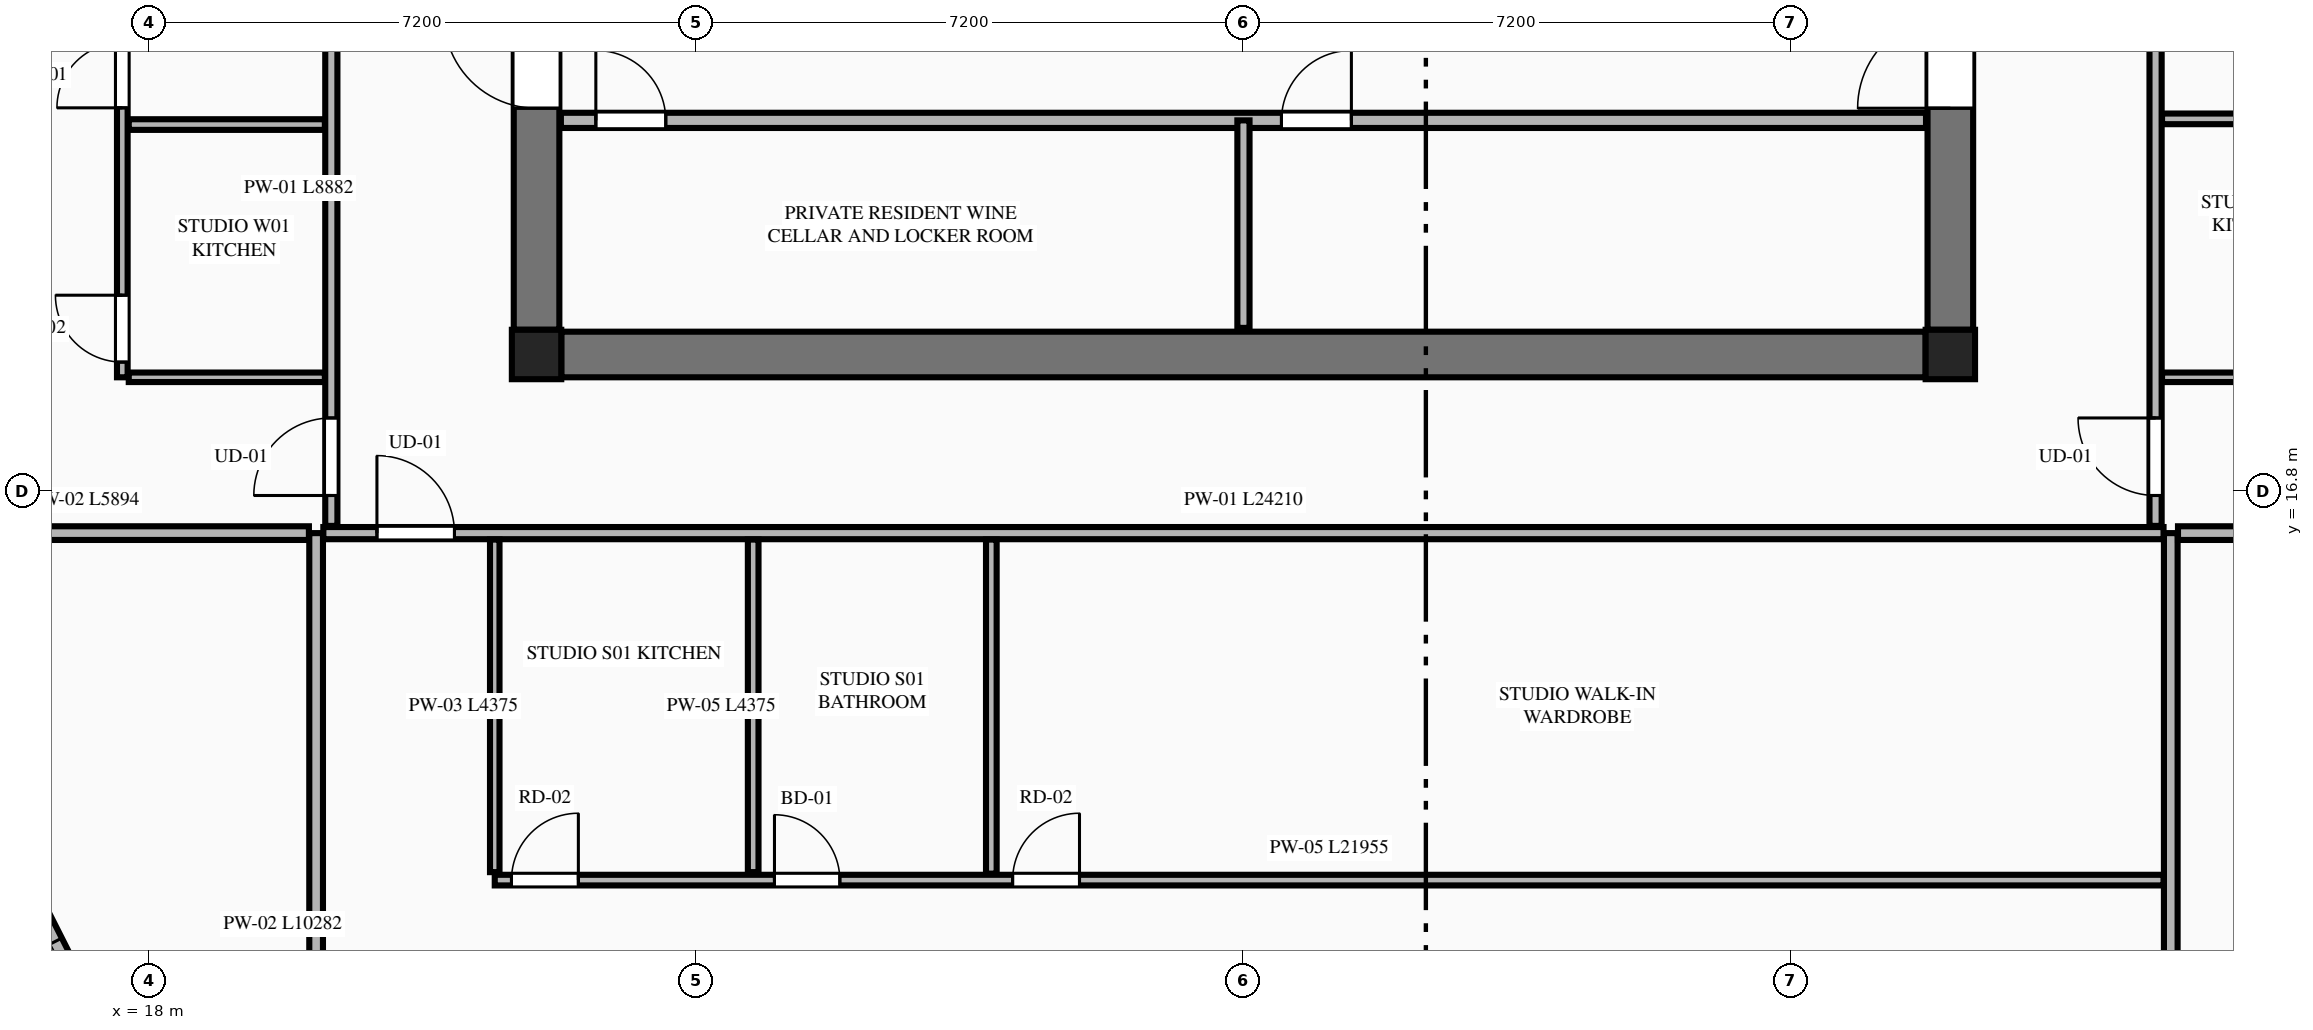
"""IFC4 building model, lengths in metres.
Left out: names, types, materials, properties, quantities, classifications, styles, units other than length and angle.
Written with IfcOpenShell. Run it as: python <this file> out.ifc"""

import sys

from ifc_helpers import new_model, si_unit, direction, frame, frame_2d, origin, origin_2d, place, context, subcontext, project, spatial, rectangle, extrude, element, fill, save


model = new_model("IFC4")
c1 = context("Model", 3, precision=1e-05, world=origin(), true_north=direction((0.0, 1.0)))
c2 = subcontext(c1, "Body", "Model", "MODEL_VIEW")
j1 = project(units=[si_unit("LENGTHUNIT", "METRE"), si_unit("PLANEANGLEUNIT", "RADIAN")], contexts=[c1])
p1 = place(None, origin())
s1 = spatial("IfcSite", under=j1, at=p1, CompositionType="ELEMENT")
p2 = place(p1, origin())
s2 = spatial("IfcBuilding", under=s1, at=p2, CompositionType="ELEMENT")
p3 = place(p2, frame((0.0, 0.0, 214.5)))
s3 = spatial("IfcBuildingStorey", under=s2, at=p3, CompositionType="ELEMENT", Elevation=214.5)
for number, where, z_axis, x_axis in (
    (1, (23.1, 18.6, 0.0), (0.0, 0.0, 1.0), (1.0, 0.0, 0.0)),
    (2, (41.7, 18.6, 0.0), (0.0, 0.0, 1.0), (1.0, 0.0, 0.0)),
):
    element("IfcColumn", number, at=place(p3, frame(where, z_axis=z_axis, x_axis=x_axis)), inside=s3, PredefinedType="COLUMN", context=c2, shape_type="SweptSolid", body=[
        extrude(rectangle(XDim=0.65, YDim=0.65, at=origin_2d()), origin(), (0.0, 0.0, 1.0), 3.55),
    ])
p4 = place(p3, frame((23.425, 18.6, 0.0), z_axis=(0.0, 0.0, 1.0), x_axis=(1.0, 0.0, 0.0)))
e3 = element("IfcWall", 3, at=p4, inside=s3, PredefinedType="SHEAR", context=c2, shape_type="SweptSolid", body=[
    extrude(rectangle(XDim=17.95, YDim=0.6, at=frame_2d((8.975, 0.0))), origin(), (0.0, 0.0, 1.0), 3.35),
])
p5 = place(p3, frame((23.1, 18.925, 0.0), z_axis=(0.0, 0.0, 1.0), x_axis=(0.0, 1.0, 0.0)))
e4 = element("IfcWall", 4, at=p5, inside=s3, PredefinedType="SHEAR", context=c2, shape_type="SweptSolid", body=[
    extrude(rectangle(XDim=13.95, YDim=0.6, at=frame_2d((6.975, 0.0))), origin(), (0.0, 0.0, 1.0), 3.35),
])
p6 = place(p5, frame((2.915, 0.0, 0.0)))
e5 = element("IfcOpeningElement", 5, at=p6, cuts=e4, PredefinedType="OPENING", context=c2, shape_type="SweptSolid", body=[
    extrude(rectangle(XDim=1.22, YDim=2.25, at=frame_2d((0.61, 1.125))), frame((0.0, 0.31, 0.0), z_axis=(0.0, -1.0, 0.0), x_axis=(1.0, 0.0, 0.0)), (0.0, 0.0, 1.0), 0.62),
])
p7 = place(p3, frame((41.7, 18.925, 0.0), z_axis=(0.0, 0.0, 1.0), x_axis=(0.0, 1.0, 0.0)))
e6 = element("IfcWall", 6, at=p7, inside=s3, PredefinedType="SHEAR", context=c2, shape_type="SweptSolid", body=[
    extrude(rectangle(XDim=13.95, YDim=0.6, at=frame_2d((6.975, 0.0))), origin(), (0.0, 0.0, 1.0), 3.35),
])
p8 = place(p7, frame((2.915, 0.0, 0.0)))
e7 = element("IfcOpeningElement", 7, at=p8, cuts=e6, PredefinedType="OPENING", context=c2, shape_type="SweptSolid", body=[
    extrude(rectangle(XDim=1.22, YDim=2.25, at=frame_2d((0.61, 1.125))), frame((0.0, 0.31, 0.0), z_axis=(0.0, -1.0, 0.0), x_axis=(1.0, 0.0, 0.0)), (0.0, 0.0, 1.0), 0.62),
])
p9 = place(p3, frame((23.42, 21.68, 0.0), z_axis=(0.0, 0.0, 1.0), x_axis=(1.0, 0.0, 0.0)))
e8 = element("IfcWall", 8, at=p9, inside=s3, PredefinedType="PLUMBINGWALL", context=c2, shape_type="SweptSolid", body=[
    extrude(rectangle(XDim=17.96, YDim=0.2, at=frame_2d((8.98, 0.0))), origin(), (0.0, 0.0, 1.0), 3.35),
])
p10 = place(p9, frame((0.46, 0.0, 0.0)))
e9 = element("IfcOpeningElement", 9, at=p10, cuts=e8, PredefinedType="OPENING", context=c2, shape_type="SweptSolid", body=[
    extrude(rectangle(XDim=0.92, YDim=2.15, at=frame_2d((0.46, 1.075))), frame((0.0, 0.11, 0.0), z_axis=(0.0, -1.0, 0.0), x_axis=(1.0, 0.0, 0.0)), (0.0, 0.0, 1.0), 0.22),
])
p11 = place(p9, frame((9.48, 0.0, 0.0)))
e10 = element("IfcOpeningElement", 10, at=p11, cuts=e8, PredefinedType="OPENING", context=c2, shape_type="SweptSolid", body=[
    extrude(rectangle(XDim=0.92, YDim=2.15, at=frame_2d((0.46, 1.075))), frame((0.0, 0.11, 0.0), z_axis=(0.0, -1.0, 0.0), x_axis=(1.0, 0.0, 0.0)), (0.0, 0.0, 1.0), 0.22),
])
p12 = place(p3, frame((32.4, 18.95, 0.0), z_axis=(0.0, 0.0, 1.0), x_axis=(0.0, 1.0, 0.0)))
e11 = element("IfcWall", 11, at=p12, inside=s3, PredefinedType="PARTITIONING", context=c2, shape_type="SweptSolid", body=[
    extrude(rectangle(XDim=2.73, YDim=0.16, at=frame_2d((1.365, 0.0))), origin(), (0.0, 0.0, 1.0), 3.35),
])
p13 = place(p3, frame((15.843, 12.545, 0.0), z_axis=(0.0, 0.0, 1.0), x_axis=(0.451544279509, -0.892248711763, 0.0)))
e12 = element("IfcWall", 12, at=p13, inside=s3, PredefinedType="STANDARD", context=c2, shape_type="SweptSolid", body=[
    extrude(rectangle(XDim=4.91, YDim=0.34, at=frame_2d((2.455, 0.0))), origin(), (0.0, 0.0, 1.0), 2.883),
])
p14 = place(p13, frame((1.905, 0.0, 0.75)))
e13 = element("IfcOpeningElement", 13, at=p14, cuts=e12, PredefinedType="OPENING", context=c2, shape_type="SweptSolid", body=[
    extrude(rectangle(XDim=1.1, YDim=1.983, at=frame_2d((0.55, 0.991))), frame((0.0, 0.18, 0.0), z_axis=(0.0, -1.0, 0.0), x_axis=(1.0, 0.0, 0.0)), (0.0, 0.0, 1.0), 0.36),
])
for number, where, z_axis, x_axis in (
    (14, (20.2, 5.968, 0.0), (0.0, 0.0, 1.0), (0.0, 1.0, 0.0)),
    (15, (44.6, 5.968, 0.0), (0.0, 0.0, 1.0), (0.0, 1.0, 0.0)),
):
    element("IfcWall", number, at=place(p3, frame(where, z_axis=z_axis, x_axis=x_axis)), inside=s3, PredefinedType="PARTITIONING", context=c2, shape_type="SweptSolid", body=[
        extrude(rectangle(XDim=10.282, YDim=0.18, at=frame_2d((5.141, 0.0))), origin(), (0.0, 0.0, 1.0), 3.35),
    ])
p15 = place(p3, frame((20.295, 16.25, 0.0), z_axis=(0.0, 0.0, 1.0), x_axis=(1.0, 0.0, 0.0)))
e16 = element("IfcWall", 16, at=p15, inside=s3, PredefinedType="PARTITIONING", context=c2, shape_type="SweptSolid", body=[
    extrude(rectangle(XDim=24.21, YDim=0.16, at=frame_2d((12.105, 0.0))), origin(), (0.0, 0.0, 1.0), 3.35),
])
p16 = place(p15, frame((0.705, 0.0, 0.0)))
e17 = element("IfcOpeningElement", 17, at=p16, cuts=e16, PredefinedType="OPENING", context=c2, shape_type="SweptSolid", body=[
    extrude(rectangle(XDim=1.02, YDim=2.25, at=frame_2d((0.51, 1.125))), frame((0.0, 0.09, 0.0), z_axis=(0.0, -1.0, 0.0), x_axis=(1.0, 0.0, 0.0)), (0.0, 0.0, 1.0), 0.18),
])
p17 = place(p3, frame((22.55, 11.79, 0.0), z_axis=(0.0, 0.0, 1.0), x_axis=(0.0, 1.0, 0.0)))
e18 = element("IfcWall", 18, at=p17, inside=s3, PredefinedType="PARTITIONING", context=c2, shape_type="SweptSolid", body=[
    extrude(rectangle(XDim=4.375, YDim=0.125, at=frame_2d((2.188, 0.0))), origin(), (0.0, 0.0, 1.0), 2.807),
])
p18 = place(p3, frame((22.55, 11.685, 0.0), z_axis=(0.0, 0.0, 1.0), x_axis=(1.0, 0.0, 0.0)))
e19 = element("IfcWall", 19, at=p18, inside=s3, PredefinedType="PLUMBINGWALL", context=c2, shape_type="SweptSolid", body=[
    extrude(rectangle(XDim=21.955, YDim=0.14, at=frame_2d((10.978, 0.0))), origin(), (0.0, 0.0, 1.0), 3.35),
])
p19 = place(p18, frame((3.68, 0.0, 0.0)))
e20 = element("IfcOpeningElement", 20, at=p19, cuts=e19, PredefinedType="OPENING", context=c2, shape_type="SweptSolid", body=[
    extrude(rectangle(XDim=0.86, YDim=2.1, at=frame_2d((0.43, 1.05))), frame((0.0, 0.08, 0.0), z_axis=(0.0, -1.0, 0.0), x_axis=(1.0, 0.0, 0.0)), (0.0, 0.0, 1.0), 0.16),
])
p20 = place(p18, frame((6.813, 0.0, 0.0)))
e21 = element("IfcOpeningElement", 21, at=p20, cuts=e19, PredefinedType="OPENING", context=c2, shape_type="SweptSolid", body=[
    extrude(rectangle(XDim=0.88, YDim=2.15, at=frame_2d((0.44, 1.075))), frame((0.0, 0.08, 0.0), z_axis=(0.0, -1.0, 0.0), x_axis=(1.0, 0.0, 0.0)), (0.0, 0.0, 1.0), 0.16),
])
p21 = place(p18, frame((0.22, 0.0, 0.0)))
e22 = element("IfcOpeningElement", 22, at=p21, cuts=e19, PredefinedType="OPENING", context=c2, shape_type="SweptSolid", body=[
    extrude(rectangle(XDim=0.88, YDim=2.15, at=frame_2d((0.44, 1.075))), frame((0.0, 0.08, 0.0), z_axis=(0.0, -1.0, 0.0), x_axis=(1.0, 0.0, 0.0)), (0.0, 0.0, 1.0), 0.16),
])
p22 = place(p3, frame((25.95, 11.79, 0.0), z_axis=(0.0, 0.0, 1.0), x_axis=(0.0, 1.0, 0.0)))
e23 = element("IfcWall", 23, at=p22, inside=s3, PredefinedType="PLUMBINGWALL", context=c2, shape_type="SweptSolid", body=[
    extrude(rectangle(XDim=4.375, YDim=0.14, at=frame_2d((2.188, 0.0))), origin(), (0.0, 0.0, 1.0), 3.35),
])
p23 = place(p3, frame((29.083, 11.77, 0.0), z_axis=(0.0, 0.0, 1.0), x_axis=(0.0, 1.0, 0.0)))
e24 = element("IfcWall", 24, at=p23, inside=s3, PredefinedType="PLUMBINGWALL", context=c2, shape_type="SweptSolid", body=[
    extrude(rectangle(XDim=4.395, YDim=0.14, at=frame_2d((2.198, 0.0))), origin(), (0.0, 0.0, 1.0), 3.35),
])
for number, where, z_axis, x_axis in (
    (25, (14.211, 16.25, 0.0), (0.0, 0.0, 1.0), (1.0, 0.0, 0.0)),
    (26, (44.695, 16.25, 0.0), (0.0, 0.0, 1.0), (1.0, 0.0, 0.0)),
):
    element("IfcWall", number, at=place(p3, frame(where, z_axis=z_axis, x_axis=x_axis)), inside=s3, PredefinedType="PARTITIONING", context=c2, shape_type="SweptSolid", body=[
        extrude(rectangle(XDim=5.894, YDim=0.18, at=frame_2d((2.947, 0.0))), origin(), (0.0, 0.0, 1.0), 3.35),
    ])
p24 = place(p3, frame((20.4, 16.345, 0.0), z_axis=(0.0, 0.0, 1.0), x_axis=(0.0, 1.0, 0.0)))
e27 = element("IfcWall", 27, at=p24, inside=s3, PredefinedType="PARTITIONING", context=c2, shape_type="SweptSolid", body=[
    extrude(rectangle(XDim=8.882, YDim=0.16, at=frame_2d((4.441, 0.0))), origin(), (0.0, 0.0, 1.0), 3.35),
])
p25 = place(p24, frame((0.4, 0.0, 0.0)))
e28 = element("IfcOpeningElement", 28, at=p25, cuts=e27, PredefinedType="OPENING", context=c2, shape_type="SweptSolid", body=[
    extrude(rectangle(XDim=1.02, YDim=2.25, at=frame_2d((0.51, 1.125))), frame((0.0, 0.09, 0.0), z_axis=(0.0, -1.0, 0.0), x_axis=(1.0, 0.0, 0.0)), (0.0, 0.0, 1.0), 0.18),
])
p26 = place(p3, frame((17.735, 18.3, 0.0), z_axis=(0.0, 0.0, 1.0), x_axis=(1.0, 0.0, 0.0)))
e29 = element("IfcWall", 29, at=p26, inside=s3, PredefinedType="PARTITIONING", context=c2, shape_type="SweptSolid", body=[
    extrude(rectangle(XDim=2.58, YDim=0.125, at=frame_2d((1.29, 0.0))), origin(), (0.0, 0.0, 1.0), 2.807),
])
p27 = place(p3, frame((17.65, 18.3, 0.0), z_axis=(0.0, 0.0, 1.0), x_axis=(0.0, 1.0, 0.0)))
e30 = element("IfcWall", 30, at=p27, inside=s3, PredefinedType="PLUMBINGWALL", context=c2, shape_type="SweptSolid", body=[
    extrude(rectangle(XDim=6.927, YDim=0.14, at=frame_2d((3.463, 0.0))), origin(), (0.0, 0.0, 1.0), 3.35),
])
p28 = place(p27, frame((3.545, 0.0, 0.0)))
e31 = element("IfcOpeningElement", 31, at=p28, cuts=e30, PredefinedType="OPENING", context=c2, shape_type="SweptSolid", body=[
    extrude(rectangle(XDim=0.86, YDim=2.1, at=frame_2d((0.43, 1.05))), frame((0.0, 0.08, 0.0), z_axis=(0.0, -1.0, 0.0), x_axis=(1.0, 0.0, 0.0)), (0.0, 0.0, 1.0), 0.16),
])
p29 = place(p27, frame((0.2, 0.0, 0.0)))
e32 = element("IfcOpeningElement", 32, at=p29, cuts=e30, PredefinedType="OPENING", context=c2, shape_type="SweptSolid", body=[
    extrude(rectangle(XDim=0.88, YDim=2.15, at=frame_2d((0.44, 1.075))), frame((0.0, 0.08, 0.0), z_axis=(0.0, -1.0, 0.0), x_axis=(1.0, 0.0, 0.0)), (0.0, 0.0, 1.0), 0.16),
])
p30 = place(p3, frame((17.735, 21.625, 0.0), z_axis=(0.0, 0.0, 1.0), x_axis=(1.0, 0.0, 0.0)))
e33 = element("IfcWall", 33, at=p30, inside=s3, PredefinedType="PLUMBINGWALL", context=c2, shape_type="SweptSolid", body=[
    extrude(rectangle(XDim=2.58, YDim=0.14, at=frame_2d((1.29, 0.0))), origin(), (0.0, 0.0, 1.0), 3.35),
])
p31 = place(p3, frame((44.4, 16.345, 0.0), z_axis=(0.0, 0.0, 1.0), x_axis=(0.0, 1.0, 0.0)))
e34 = element("IfcWall", 34, at=p31, inside=s3, PredefinedType="PARTITIONING", context=c2, shape_type="SweptSolid", body=[
    extrude(rectangle(XDim=9.638, YDim=0.16, at=frame_2d((4.819, 0.0))), origin(), (0.0, 0.0, 1.0), 3.35),
])
p32 = place(p31, frame((0.4, 0.0, 0.0)))
e35 = element("IfcOpeningElement", 35, at=p32, cuts=e34, PredefinedType="OPENING", context=c2, shape_type="SweptSolid", body=[
    extrude(rectangle(XDim=1.02, YDim=2.25, at=frame_2d((0.51, 1.125))), frame((0.0, 0.09, 0.0), z_axis=(0.0, -1.0, 0.0), x_axis=(1.0, 0.0, 0.0)), (0.0, 0.0, 1.0), 0.18),
])
p33 = place(p3, frame((44.485, 18.3, 0.0), z_axis=(0.0, 0.0, 1.0), x_axis=(1.0, 0.0, 0.0)))
e36 = element("IfcWall", 36, at=p33, inside=s3, PredefinedType="PARTITIONING", context=c2, shape_type="SweptSolid", body=[
    extrude(rectangle(XDim=2.58, YDim=0.125, at=frame_2d((1.29, 0.0))), origin(), (0.0, 0.0, 1.0), 2.807),
])
p34 = place(p3, frame((44.485, 21.7, 0.0), z_axis=(0.0, 0.0, 1.0), x_axis=(1.0, 0.0, 0.0)))
e37 = element("IfcWall", 37, at=p34, inside=s3, PredefinedType="PLUMBINGWALL", context=c2, shape_type="SweptSolid", body=[
    extrude(rectangle(XDim=2.58, YDim=0.14, at=frame_2d((1.29, 0.0))), origin(), (0.0, 0.0, 1.0), 3.35),
])
p35 = place(p6, origin())
e38 = element("IfcDoor", 38, at=p35, inside=s3, OperationType="SINGLE_SWING_RIGHT", PredefinedType="DOOR", context=c2, shape_type="SweptSolid", body=[
    extrude(rectangle(XDim=1.22, YDim=2.25, at=frame_2d((0.61, 1.125))), frame((0.0, 0.025, 0.0), z_axis=(0.0, -1.0, 0.0), x_axis=(1.0, 0.0, 0.0)), (0.0, 0.0, 1.0), 0.05),
])
fill(e5, e38)
p36 = place(p8, origin())
e39 = element("IfcDoor", 39, at=p36, inside=s3, OperationType="SINGLE_SWING_LEFT", PredefinedType="DOOR", context=c2, shape_type="SweptSolid", body=[
    extrude(rectangle(XDim=1.22, YDim=2.25, at=frame_2d((0.61, 1.125))), frame((0.0, 0.025, 0.0), z_axis=(0.0, -1.0, 0.0), x_axis=(1.0, 0.0, 0.0)), (0.0, 0.0, 1.0), 0.05),
])
fill(e7, e39)
p37 = place(p10, origin())
e40 = element("IfcDoor", 40, at=p37, inside=s3, OperationType="SINGLE_SWING_LEFT", PredefinedType="DOOR", context=c2, shape_type="SweptSolid", body=[
    extrude(rectangle(XDim=0.92, YDim=2.15, at=frame_2d((0.46, 1.075))), frame((0.0, 0.025, 0.0), z_axis=(0.0, -1.0, 0.0), x_axis=(1.0, 0.0, 0.0)), (0.0, 0.0, 1.0), 0.05),
])
fill(e9, e40)
p38 = place(p11, origin())
e41 = element("IfcDoor", 41, at=p38, inside=s3, OperationType="SINGLE_SWING_RIGHT", PredefinedType="DOOR", context=c2, shape_type="SweptSolid", body=[
    extrude(rectangle(XDim=0.92, YDim=2.15, at=frame_2d((0.46, 1.075))), frame((0.0, 0.025, 0.0), z_axis=(0.0, -1.0, 0.0), x_axis=(1.0, 0.0, 0.0)), (0.0, 0.0, 1.0), 0.05),
])
fill(e10, e41)
p39 = place(p14, origin())
e42 = element("IfcWindow", 42, at=p39, inside=s3, PartitioningType="SINGLE_PANEL", PredefinedType="WINDOW", context=c2, shape_type="SweptSolid", body=[
    extrude(rectangle(XDim=1.1, YDim=1.983, at=frame_2d((0.55, 0.991))), frame((0.0, 0.03, 0.0), z_axis=(0.0, -1.0, 0.0), x_axis=(1.0, 0.0, 0.0)), (0.0, 0.0, 1.0), 0.06),
])
fill(e13, e42)
p40 = place(p19, origin())
e43 = element("IfcDoor", 43, at=p40, inside=s3, OperationType="SINGLE_SWING_LEFT", PredefinedType="DOOR", context=c2, shape_type="SweptSolid", body=[
    extrude(rectangle(XDim=0.86, YDim=2.1, at=frame_2d((0.43, 1.05))), frame((0.0, 0.025, 0.0), z_axis=(0.0, -1.0, 0.0), x_axis=(1.0, 0.0, 0.0)), (0.0, 0.0, 1.0), 0.05),
])
fill(e20, e43)
p41 = place(p20, origin())
e44 = element("IfcDoor", 44, at=p41, inside=s3, OperationType="SINGLE_SWING_RIGHT", PredefinedType="DOOR", context=c2, shape_type="SweptSolid", body=[
    extrude(rectangle(XDim=0.88, YDim=2.15, at=frame_2d((0.44, 1.075))), frame((0.0, 0.025, 0.0), z_axis=(0.0, -1.0, 0.0), x_axis=(1.0, 0.0, 0.0)), (0.0, 0.0, 1.0), 0.05),
])
fill(e21, e44)
p42 = place(p16, origin())
e45 = element("IfcDoor", 45, at=p42, inside=s3, OperationType="SINGLE_SWING_LEFT", PredefinedType="DOOR", context=c2, shape_type="SweptSolid", body=[
    extrude(rectangle(XDim=1.02, YDim=2.25, at=frame_2d((0.51, 1.125))), frame((0.0, 0.025, 0.0), z_axis=(0.0, -1.0, 0.0), x_axis=(1.0, 0.0, 0.0)), (0.0, 0.0, 1.0), 0.05),
])
fill(e17, e45)
p43 = place(p21, origin())
e46 = element("IfcDoor", 46, at=p43, inside=s3, OperationType="SINGLE_SWING_RIGHT", PredefinedType="DOOR", context=c2, shape_type="SweptSolid", body=[
    extrude(rectangle(XDim=0.88, YDim=2.15, at=frame_2d((0.44, 1.075))), frame((0.0, 0.025, 0.0), z_axis=(0.0, -1.0, 0.0), x_axis=(1.0, 0.0, 0.0)), (0.0, 0.0, 1.0), 0.05),
])
fill(e22, e46)
p44 = place(p28, origin())
e47 = element("IfcDoor", 47, at=p44, inside=s3, OperationType="SINGLE_SWING_LEFT", PredefinedType="DOOR", context=c2, shape_type="SweptSolid", body=[
    extrude(rectangle(XDim=0.86, YDim=2.1, at=frame_2d((0.43, 1.05))), frame((0.0, 0.025, 0.0), z_axis=(0.0, -1.0, 0.0), x_axis=(1.0, 0.0, 0.0)), (0.0, 0.0, 1.0), 0.05),
])
fill(e31, e47)
p45 = place(p25, origin())
e48 = element("IfcDoor", 48, at=p45, inside=s3, OperationType="SINGLE_SWING_LEFT", PredefinedType="DOOR", context=c2, shape_type="SweptSolid", body=[
    extrude(rectangle(XDim=1.02, YDim=2.25, at=frame_2d((0.51, 1.125))), frame((0.0, 0.025, 0.0), z_axis=(0.0, -1.0, 0.0), x_axis=(1.0, 0.0, 0.0)), (0.0, 0.0, 1.0), 0.05),
])
fill(e28, e48)
p46 = place(p29, origin())
e49 = element("IfcDoor", 49, at=p46, inside=s3, OperationType="SINGLE_SWING_RIGHT", PredefinedType="DOOR", context=c2, shape_type="SweptSolid", body=[
    extrude(rectangle(XDim=0.88, YDim=2.15, at=frame_2d((0.44, 1.075))), frame((0.0, 0.025, 0.0), z_axis=(0.0, -1.0, 0.0), x_axis=(1.0, 0.0, 0.0)), (0.0, 0.0, 1.0), 0.05),
])
fill(e32, e49)
p47 = place(p32, origin())
e50 = element("IfcDoor", 50, at=p47, inside=s3, OperationType="SINGLE_SWING_RIGHT", PredefinedType="DOOR", context=c2, shape_type="SweptSolid", body=[
    extrude(rectangle(XDim=1.02, YDim=2.25, at=frame_2d((0.51, 1.125))), frame((0.0, 0.025, 0.0), z_axis=(0.0, -1.0, 0.0), x_axis=(1.0, 0.0, 0.0)), (0.0, 0.0, 1.0), 0.05),
])
fill(e35, e50)
save(model, sys.argv[1])
